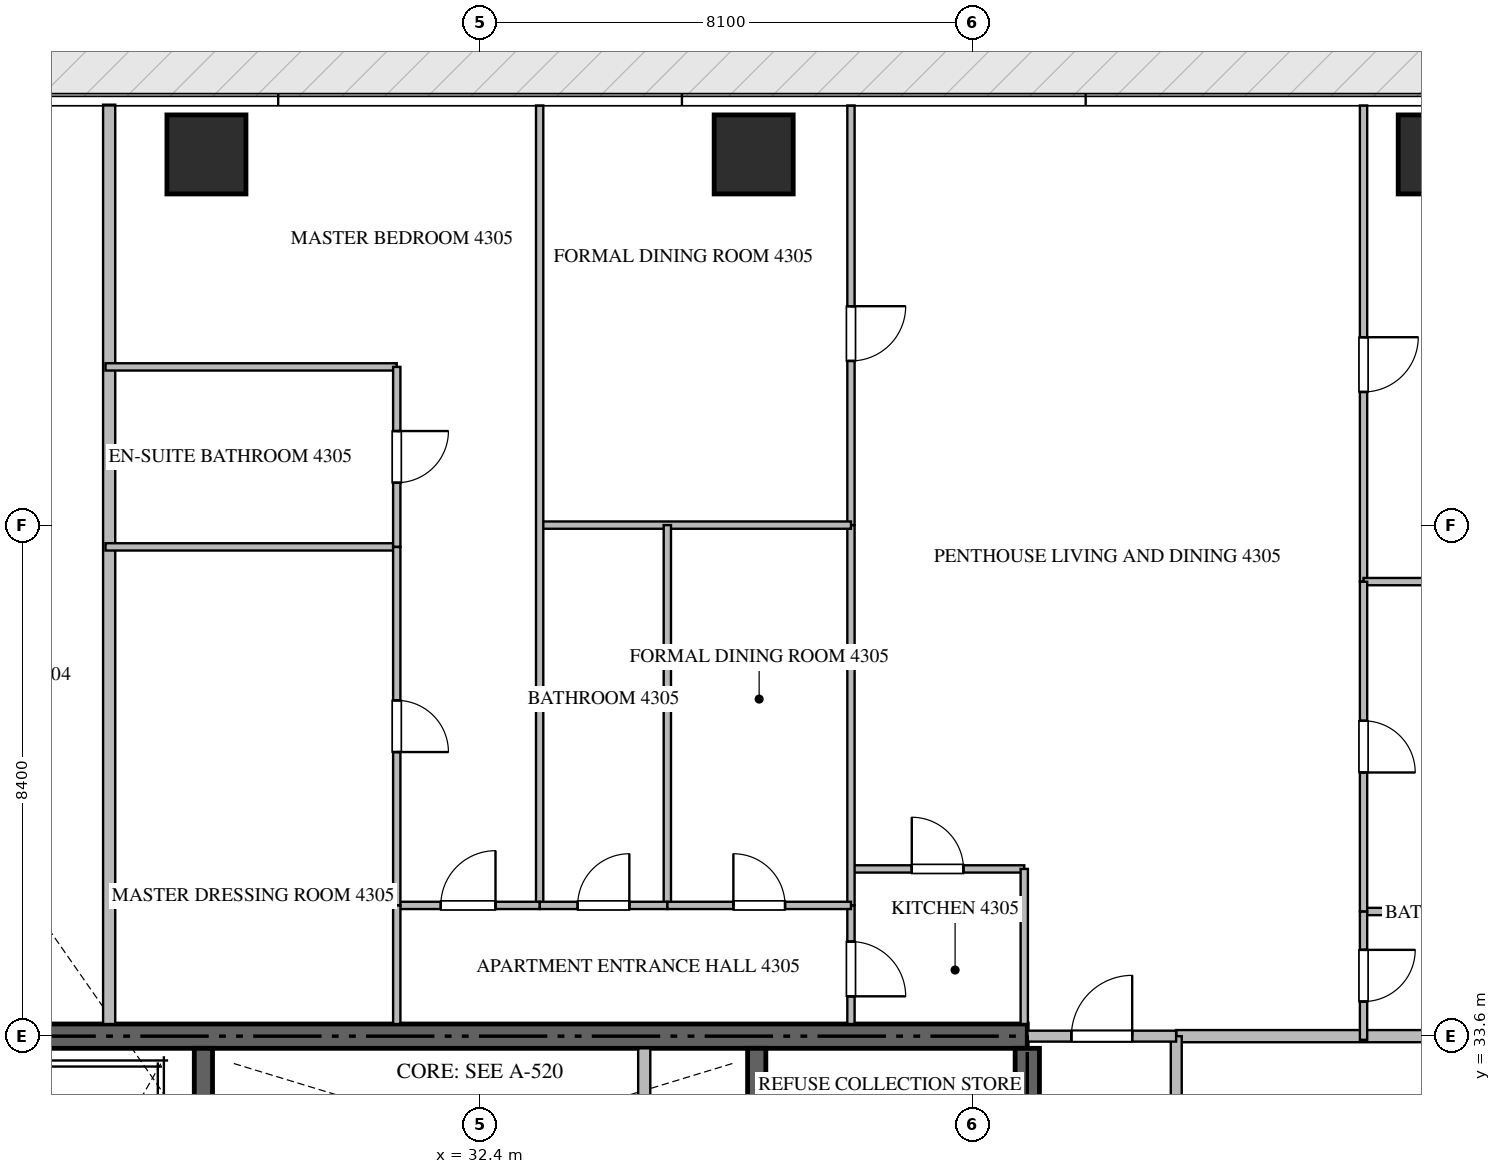
"""IFC4 building model, lengths in metres.
Left out: names, types, materials, properties, quantities, classifications, styles, units other than length and angle.
Written with IfcOpenShell. Run it as: python <this file> out.ifc"""

import sys

from ifc_helpers import new_model, si_unit, direction, frame, frame_2d, origin, origin_2d, place, context, subcontext, project, spatial, rectangle, extrude, source, transform, mapped, element, fill, save


model = new_model("IFC4")
c1 = context("Model", 3, precision=1e-05, world=origin(), true_north=direction((0.0, 1.0)))
c2 = subcontext(c1, "Body", "Model", "MODEL_VIEW")
j1 = project(units=[si_unit("LENGTHUNIT", "METRE"), si_unit("PLANEANGLEUNIT", "RADIAN")], contexts=[c1])
p1 = place(None, origin())
s1 = spatial("IfcSite", under=j1, at=p1, CompositionType="ELEMENT")
p2 = place(p1, origin())
s2 = spatial("IfcBuilding", under=s1, at=p2, CompositionType="ELEMENT")
p3 = place(p2, frame((0.0, 0.0, 172.65)))
s3 = spatial("IfcBuildingStorey", under=s2, at=p3, CompositionType="ELEMENT", Elevation=172.65)
p4 = place(p3, frame((41.4, 33.6, -0.26), z_axis=(0.0, 0.0, 1.0), x_axis=(-1.0, 0.0, 0.0)))
e1 = element("IfcWall", 1, at=p4, inside=s3, PredefinedType="SHEAR", context=c2, shape_type="SweptSolid", body=[
    extrude(rectangle(XDim=18.0, YDim=0.4, at=frame_2d((9.0, 0.0))), origin(), (0.0, 0.0, 1.0), 3.748),
])
p5 = place(p3, frame((41.4, 27.75, -0.26), z_axis=(0.0, 0.0, 1.0), x_axis=(0.0, 1.0, 0.0)))
e2 = element("IfcWall", 2, at=p5, inside=s3, PredefinedType="SHEAR", context=c2, shape_type="SweptSolid", body=[
    extrude(rectangle(XDim=5.65, YDim=0.4, at=frame_2d((2.825, 0.0))), origin(), (0.0, 0.0, 1.0), 3.748),
])
p6 = place(p3, frame((27.85, 23.55, -0.26), z_axis=(0.0, 0.0, 1.0), x_axis=(0.0, 1.0, 0.0)))
e3 = element("IfcWall", 3, at=p6, inside=s3, PredefinedType="SHEAR", context=c2, shape_type="SweptSolid", body=[
    extrude(rectangle(XDim=9.85, YDim=0.3, at=frame_2d((4.925, 0.0))), origin(), (0.0, 0.0, 1.0), 3.748),
])
p7 = place(p3, frame((36.95, 27.05, -0.26), z_axis=(0.0, 0.0, 1.0), x_axis=(0.0, 1.0, 0.0)))
e4 = element("IfcWall", 4, at=p7, inside=s3, PredefinedType="SHEAR", context=c2, shape_type="SweptSolid", body=[
    extrude(rectangle(XDim=6.35, YDim=0.3, at=frame_2d((3.175, 0.0))), origin(), (0.0, 0.0, 1.0), 3.748),
])
m1 = source(origin(), c2, "Body", "SweptSolid", [
    extrude(rectangle(XDim=1.3, YDim=1.3, at=origin_2d()), origin(), (0.0, 0.0, 1.0), 3.75),
])
for number, where, z_axis, x_axis in (
    (5, (27.9, 48.1, -0.26), (0.0, 0.0, 1.0), (1.0, 0.0, 0.0)),
    (6, (36.9, 48.1, -0.26), (0.0, 0.0, 1.0), (1.0, 0.0, 0.0)),
    (7, (48.15, 48.1, -0.26), (0.0, 0.0, 1.0), (1.0, 0.0, 0.0)),
):
    element("IfcColumn", number, at=place(p3, frame(where, z_axis=z_axis, x_axis=x_axis)), inside=s3, PredefinedType="COLUMN", context=c2, shape_type="MappedRepresentation", body=[
        mapped(m1, transform((0.0, 0.0, 0.0), scale=1.0)),
    ])
p8 = place(p3, frame((35.1, 30.75, 0.0), z_axis=(0.0, 0.0, 1.0), x_axis=(0.0, 1.0, 0.0)))
e8 = element("IfcWall", 8, at=p8, inside=s3, PredefinedType="STANDARD", context=c2, shape_type="SweptSolid", body=[
    extrude(rectangle(XDim=2.65, YDim=0.2, at=frame_2d((1.325, 0.0))), origin(), (0.0, 0.0, 1.0), 3.49),
])
p9 = place(p3, frame((26.3, 33.8, 0.0), z_axis=(0.0, 0.0, 1.0), x_axis=(0.0, 1.0, 0.0)))
e9 = element("IfcWall", 9, at=p9, inside=s3, PredefinedType="PARTITIONING", context=c2, shape_type="SweptSolid", body=[
    extrude(rectangle(XDim=15.118, YDim=0.2, at=frame_2d((7.559, 0.0))), origin(), (0.0, 0.0, 1.0), 3.49),
])
p10 = place(p3, frame((43.85, 33.6, 0.0), z_axis=(0.0, 0.0, 1.0), x_axis=(1.0, 0.0, 0.0)))
e10 = element("IfcWall", 10, at=p10, inside=s3, PredefinedType="PARTITIONING", context=c2, shape_type="SweptSolid", body=[
    extrude(rectangle(XDim=13.068, YDim=0.2, at=frame_2d((6.534, 0.0))), origin(), (0.0, 0.0, 1.0), 3.49),
])
p11 = place(p3, frame((43.85, 14.9, 0.0), z_axis=(0.0, 0.0, 1.0), x_axis=(0.0, 1.0, 0.0)))
e11 = element("IfcWall", 11, at=p11, inside=s3, PredefinedType="PARTITIONING", context=c2, shape_type="SweptSolid", body=[
    extrude(rectangle(XDim=18.7, YDim=0.18, at=frame_2d((9.35, 0.0))), origin(), (0.0, 0.0, 1.0), 3.49),
])
p12 = place(p11, frame((1.805, 0.0, 0.0)))
e12 = element("IfcOpeningElement", 12, at=p12, cuts=e11, PredefinedType="OPENING", context=c2, shape_type="SweptSolid", body=[
    extrude(rectangle(XDim=1.0, YDim=2.15, at=frame_2d((0.5, 1.075))), frame((0.0, 0.1, 0.0), z_axis=(0.0, -1.0, 0.0), x_axis=(1.0, 0.0, 0.0)), (0.0, 0.0, 1.0), 0.2),
])
p13 = place(p3, frame((41.402, 33.6, 0.0), z_axis=(0.0, 0.0, 1.0), x_axis=(1.0, 0.0, 0.0)))
e13 = element("IfcWall", 13, at=p13, inside=s3, PredefinedType="PARTITIONING", context=c2, shape_type="SweptSolid", body=[
    extrude(rectangle(XDim=2.446, YDim=0.18, at=frame_2d((1.223, 0.0))), origin(), (0.0, 0.0, 1.0), 3.49),
])
p14 = place(p13, frame((0.723, 0.0, 0.0)))
e14 = element("IfcOpeningElement", 14, at=p14, cuts=e13, PredefinedType="OPENING", context=c2, shape_type="SweptSolid", body=[
    extrude(rectangle(XDim=1.0, YDim=2.15, at=frame_2d((0.5, 1.075))), frame((0.0, 0.1, 0.0), z_axis=(0.0, -1.0, 0.0), x_axis=(1.0, 0.0, 0.0)), (0.0, 0.0, 1.0), 0.2),
])
p15 = place(p3, frame((38.5, 36.35, 0.0), z_axis=(0.0, 0.0, 1.0), x_axis=(1.0, 0.0, 0.0)))
e15 = element("IfcWall", 15, at=p15, inside=s3, PredefinedType="PARTITIONING", context=c2, shape_type="SweptSolid", body=[
    extrude(rectangle(XDim=2.85, YDim=0.12, at=frame_2d((1.425, 0.0))), origin(), (0.0, 0.0, 1.0), 3.49),
])
p16 = place(p15, frame((1.0, 0.0, 0.0)))
e16 = element("IfcOpeningElement", 16, at=p16, cuts=e15, PredefinedType="OPENING", context=c2, shape_type="SweptSolid", body=[
    extrude(rectangle(XDim=0.85, YDim=2.1, at=frame_2d((0.425, 1.05))), frame((0.0, 0.07, 0.0), z_axis=(0.0, -1.0, 0.0), x_axis=(1.0, 0.0, 0.0)), (0.0, 0.0, 1.0), 0.14),
])
p17 = place(p3, frame((41.35, 36.35, 0.0), z_axis=(0.0, 0.0, 1.0), x_axis=(0.0, -1.0, 0.0)))
e17 = element("IfcWall", 17, at=p17, inside=s3, PredefinedType="PARTITIONING", context=c2, shape_type="SweptSolid", body=[
    extrude(rectangle(XDim=2.55, YDim=0.12, at=frame_2d((1.275, 0.0))), origin(), (0.0, 0.0, 1.0), 3.49),
])
p18 = place(p3, frame((38.5, 35.75, 0.0), z_axis=(0.0, 0.0, 1.0), x_axis=(0.0, -1.0, 0.0)))
e18 = element("IfcWall", 18, at=p18, inside=s3, PredefinedType="PARTITIONING", context=c2, shape_type="SweptSolid", body=[
    extrude(rectangle(XDim=1.95, YDim=0.12, at=frame_2d((0.975, 0.0))), origin(), (0.0, 0.0, 1.0), 3.49),
])
p19 = place(p18, frame((0.595, 0.0, 0.0)))
e19 = element("IfcOpeningElement", 19, at=p19, cuts=e18, PredefinedType="OPENING", context=c2, shape_type="SweptSolid", body=[
    extrude(rectangle(XDim=0.9, YDim=2.1, at=frame_2d((0.45, 1.05))), frame((0.0, 0.07, 0.0), z_axis=(0.0, -1.0, 0.0), x_axis=(1.0, 0.0, 0.0)), (0.0, 0.0, 1.0), 0.14),
])
p20 = place(p3, frame((38.5, 48.905, 0.0), z_axis=(0.0, 0.0, 1.0), x_axis=(0.0, -1.0, 0.0)))
e20 = element("IfcWall", 20, at=p20, inside=s3, PredefinedType="PARTITIONING", context=c2, shape_type="SweptSolid", body=[
    extrude(rectangle(XDim=6.901, YDim=0.12, at=frame_2d((3.451, 0.0))), origin(), (0.0, 0.0, 1.0), 3.49),
])
p21 = place(p20, frame((3.301, 0.0, 0.0)))
e21 = element("IfcOpeningElement", 21, at=p21, cuts=e20, PredefinedType="OPENING", context=c2, shape_type="SweptSolid", body=[
    extrude(rectangle(XDim=0.9, YDim=2.1, at=frame_2d((0.45, 1.05))), frame((0.0, 0.07, 0.0), z_axis=(0.0, -1.0, 0.0), x_axis=(1.0, 0.0, 0.0)), (0.0, 0.0, 1.0), 0.14),
])
p22 = place(p3, frame((38.5, 42.002, 0.0), z_axis=(0.0, 0.0, 1.0), x_axis=(0.0, -1.0, 0.0)))
e22 = element("IfcWall", 22, at=p22, inside=s3, PredefinedType="PARTITIONING", context=c2, shape_type="SweptSolid", body=[
    extrude(rectangle(XDim=6.25, YDim=0.12, at=frame_2d((3.125, 0.0))), origin(), (0.0, 0.0, 1.0), 3.49),
])
p23 = place(p3, frame((33.38, 42.004, 0.0), z_axis=(0.0, 0.0, 1.0), x_axis=(1.0, 0.0, 0.0)))
e23 = element("IfcWall", 23, at=p23, inside=s3, PredefinedType="PARTITIONING", context=c2, shape_type="SweptSolid", body=[
    extrude(rectangle(XDim=5.12, YDim=0.12, at=frame_2d((2.56, 0.0))), origin(), (0.0, 0.0, 1.0), 3.49),
])
p24 = place(p3, frame((33.38, 48.905, 0.0), z_axis=(0.0, 0.0, 1.0), x_axis=(0.0, -1.0, 0.0)))
e24 = element("IfcWall", 24, at=p24, inside=s3, PredefinedType="PARTITIONING", context=c2, shape_type="SweptSolid", body=[
    extrude(rectangle(XDim=13.155, YDim=0.12, at=frame_2d((6.578, 0.0))), origin(), (0.0, 0.0, 1.0), 3.49),
])
p25 = place(p3, frame((35.48, 42.004, 0.0), z_axis=(0.0, 0.0, 1.0), x_axis=(0.0, -1.0, 0.0)))
e25 = element("IfcWall", 25, at=p25, inside=s3, PredefinedType="PARTITIONING", context=c2, shape_type="SweptSolid", body=[
    extrude(rectangle(XDim=6.254, YDim=0.12, at=frame_2d((3.127, 0.0))), origin(), (0.0, 0.0, 1.0), 3.49),
])
p26 = place(p3, frame((33.38, 35.75, 0.0), z_axis=(0.0, 0.0, 1.0), x_axis=(1.0, 0.0, 0.0)))
e26 = element("IfcWall", 26, at=p26, inside=s3, PredefinedType="PARTITIONING", context=c2, shape_type="SweptSolid", body=[
    extrude(rectangle(XDim=2.1, YDim=0.12, at=frame_2d((1.05, 0.0))), origin(), (0.0, 0.0, 1.0), 3.49),
])
p27 = place(p26, frame((0.625, 0.0, 0.0)))
e27 = element("IfcOpeningElement", 27, at=p27, cuts=e26, PredefinedType="OPENING", context=c2, shape_type="SweptSolid", body=[
    extrude(rectangle(XDim=0.85, YDim=2.1, at=frame_2d((0.425, 1.05))), frame((0.0, 0.07, 0.0), z_axis=(0.0, -1.0, 0.0), x_axis=(1.0, 0.0, 0.0)), (0.0, 0.0, 1.0), 0.14),
])
p28 = place(p3, frame((35.482, 35.75, 0.0), z_axis=(0.0, 0.0, 1.0), x_axis=(1.0, 0.0, 0.0)))
e28 = element("IfcWall", 28, at=p28, inside=s3, PredefinedType="PARTITIONING", context=c2, shape_type="SweptSolid", body=[
    extrude(rectangle(XDim=3.018, YDim=0.12, at=frame_2d((1.509, 0.0))), origin(), (0.0, 0.0, 1.0), 3.49),
])
p29 = place(p28, frame((1.084, 0.0, 0.0)))
e29 = element("IfcOpeningElement", 29, at=p29, cuts=e28, PredefinedType="OPENING", context=c2, shape_type="SweptSolid", body=[
    extrude(rectangle(XDim=0.85, YDim=2.1, at=frame_2d((0.425, 1.05))), frame((0.0, 0.07, 0.0), z_axis=(0.0, -1.0, 0.0), x_axis=(1.0, 0.0, 0.0)), (0.0, 0.0, 1.0), 0.14),
])
p30 = place(p3, frame((31.03, 35.75, 0.0), z_axis=(0.0, 0.0, 1.0), x_axis=(1.0, 0.0, 0.0)))
e30 = element("IfcWall", 30, at=p30, inside=s3, PredefinedType="PARTITIONING", context=c2, shape_type="SweptSolid", body=[
    extrude(rectangle(XDim=2.348, YDim=0.12, at=frame_2d((1.174, 0.0))), origin(), (0.0, 0.0, 1.0), 3.49),
])
p31 = place(p30, frame((0.724, 0.0, 0.0)))
e31 = element("IfcOpeningElement", 31, at=p31, cuts=e30, PredefinedType="OPENING", context=c2, shape_type="SweptSolid", body=[
    extrude(rectangle(XDim=0.9, YDim=2.1, at=frame_2d((0.45, 1.05))), frame((0.0, 0.07, 0.0), z_axis=(0.0, -1.0, 0.0), x_axis=(1.0, 0.0, 0.0)), (0.0, 0.0, 1.0), 0.14),
])
for number, where, z_axis, x_axis in (
    (32, (26.24, 44.606, 0.0), (0.0, 0.0, 1.0), (1.0, 0.0, 0.0)),
    (33, (26.24, 41.646, 0.0), (0.0, 0.0, 1.0), (1.0, 0.0, 0.0)),
):
    element("IfcWall", number, at=place(p3, frame(where, z_axis=z_axis, x_axis=x_axis)), inside=s3, PredefinedType="PARTITIONING", context=c2, shape_type="SweptSolid", body=[
        extrude(rectangle(XDim=4.79, YDim=0.12, at=frame_2d((2.395, 0.0))), origin(), (0.0, 0.0, 1.0), 3.49),
    ])
p32 = place(p3, frame((31.03, 44.606, 0.0), z_axis=(0.0, 0.0, 1.0), x_axis=(0.0, -1.0, 0.0)))
e34 = element("IfcWall", 34, at=p32, inside=s3, PredefinedType="PARTITIONING", context=c2, shape_type="SweptSolid", body=[
    extrude(rectangle(XDim=2.96, YDim=0.12, at=frame_2d((1.48, 0.0))), origin(), (0.0, 0.0, 1.0), 3.49),
])
p33 = place(p32, frame((1.055, 0.0, 0.0)))
e35 = element("IfcOpeningElement", 35, at=p33, cuts=e34, PredefinedType="OPENING", context=c2, shape_type="SweptSolid", body=[
    extrude(rectangle(XDim=0.85, YDim=2.1, at=frame_2d((0.425, 1.05))), frame((0.0, 0.07, 0.0), z_axis=(0.0, -1.0, 0.0), x_axis=(1.0, 0.0, 0.0)), (0.0, 0.0, 1.0), 0.14),
])
p34 = place(p3, frame((31.03, 41.644, 0.0), z_axis=(0.0, 0.0, 1.0), x_axis=(0.0, -1.0, 0.0)))
e36 = element("IfcWall", 36, at=p34, inside=s3, PredefinedType="PARTITIONING", context=c2, shape_type="SweptSolid", body=[
    extrude(rectangle(XDim=5.894, YDim=0.12, at=frame_2d((2.947, 0.0))), origin(), (0.0, 0.0, 1.0), 3.49),
])
p35 = place(p34, frame((2.522, 0.0, 0.0)))
e37 = element("IfcOpeningElement", 37, at=p35, cuts=e36, PredefinedType="OPENING", context=c2, shape_type="SweptSolid", body=[
    extrude(rectangle(XDim=0.85, YDim=2.1, at=frame_2d((0.425, 1.05))), frame((0.0, 0.07, 0.0), z_axis=(0.0, -1.0, 0.0), x_axis=(1.0, 0.0, 0.0)), (0.0, 0.0, 1.0), 0.14),
])
p36 = place(p3, frame((31.03, 35.748, 0.0), z_axis=(0.0, 0.0, 1.0), x_axis=(0.0, -1.0, 0.0)))
e38 = element("IfcWall", 38, at=p36, inside=s3, PredefinedType="PARTITIONING", context=c2, shape_type="SweptSolid", body=[
    extrude(rectangle(XDim=1.948, YDim=0.12, at=frame_2d((0.974, 0.0))), origin(), (0.0, 0.0, 1.0), 3.49),
])
p37 = place(p3, frame((46.93, 48.905, 0.0), z_axis=(0.0, 0.0, 1.0), x_axis=(0.0, -1.0, 0.0)))
e39 = element("IfcWall", 39, at=p37, inside=s3, PredefinedType="PARTITIONING", context=c2, shape_type="SweptSolid", body=[
    extrude(rectangle(XDim=7.83, YDim=0.12, at=frame_2d((3.915, 0.0))), origin(), (0.0, 0.0, 1.0), 3.49),
])
p38 = place(p37, frame((3.811, 0.0, 0.0)))
e40 = element("IfcOpeningElement", 40, at=p38, cuts=e39, PredefinedType="OPENING", context=c2, shape_type="SweptSolid", body=[
    extrude(rectangle(XDim=0.9, YDim=2.1, at=frame_2d((0.45, 1.05))), frame((0.0, 0.07, 0.0), z_axis=(0.0, -1.0, 0.0), x_axis=(1.0, 0.0, 0.0)), (0.0, 0.0, 1.0), 0.14),
])
p39 = place(p3, frame((46.93, 41.075, 0.0), z_axis=(0.0, 0.0, 1.0), x_axis=(1.0, 0.0, 0.0)))
e41 = element("IfcWall", 41, at=p39, inside=s3, PredefinedType="PARTITIONING", context=c2, shape_type="SweptSolid", body=[
    extrude(rectangle(XDim=5.975, YDim=0.12, at=frame_2d((2.988, 0.0))), origin(), (0.0, 0.0, 1.0), 3.49),
])
p40 = place(p3, frame((46.93, 35.65, 0.0), z_axis=(0.0, 0.0, 1.0), x_axis=(1.0, 0.0, 0.0)))
e42 = element("IfcWall", 42, at=p40, inside=s3, PredefinedType="PARTITIONING", context=c2, shape_type="SweptSolid", body=[
    extrude(rectangle(XDim=3.2, YDim=0.12, at=frame_2d((1.6, 0.0))), origin(), (0.0, 0.0, 1.0), 3.49),
])
p41 = place(p3, frame((46.93, 41.073, 0.0), z_axis=(0.0, 0.0, 1.0), x_axis=(0.0, -1.0, 0.0)))
e43 = element("IfcWall", 43, at=p41, inside=s3, PredefinedType="PARTITIONING", context=c2, shape_type="SweptSolid", body=[
    extrude(rectangle(XDim=5.423, YDim=0.12, at=frame_2d((2.711, 0.0))), origin(), (0.0, 0.0, 1.0), 3.49),
])
p42 = place(p41, frame((2.287, 0.0, 0.0)))
e44 = element("IfcOpeningElement", 44, at=p42, cuts=e43, PredefinedType="OPENING", context=c2, shape_type="SweptSolid", body=[
    extrude(rectangle(XDim=0.85, YDim=2.1, at=frame_2d((0.425, 1.05))), frame((0.0, 0.07, 0.0), z_axis=(0.0, -1.0, 0.0), x_axis=(1.0, 0.0, 0.0)), (0.0, 0.0, 1.0), 0.14),
])
p43 = place(p3, frame((46.93, 35.648, 0.0), z_axis=(0.0, 0.0, 1.0), x_axis=(0.0, -1.0, 0.0)))
e45 = element("IfcWall", 45, at=p43, inside=s3, PredefinedType="PARTITIONING", context=c2, shape_type="SweptSolid", body=[
    extrude(rectangle(XDim=2.108, YDim=0.12, at=frame_2d((1.054, 0.0))), origin(), (0.0, 0.0, 1.0), 3.49),
])
p44 = place(p43, frame((0.629, 0.0, 0.0)))
e46 = element("IfcOpeningElement", 46, at=p44, cuts=e45, PredefinedType="OPENING", context=c2, shape_type="SweptSolid", body=[
    extrude(rectangle(XDim=0.85, YDim=2.1, at=frame_2d((0.425, 1.05))), frame((0.0, 0.07, 0.0), z_axis=(0.0, -1.0, 0.0), x_axis=(1.0, 0.0, 0.0)), (0.0, 0.0, 1.0), 0.14),
])
m2 = source(origin(), c2, "Body", "SweptSolid", [
    extrude(rectangle(XDim=1.0, YDim=2.15, at=frame_2d((0.5, 1.075))), frame((0.0, 0.025, 0.0), z_axis=(0.0, -1.0, 0.0), x_axis=(1.0, 0.0, 0.0)), (0.0, 0.0, 1.0), 0.05),
])
p45 = place(p14, origin())
e47 = element("IfcDoor", 47, at=p45, inside=s3, OperationType="SINGLE_SWING_RIGHT", PredefinedType="DOOR", context=c2, shape_type="MappedRepresentation", body=[
    mapped(m2, transform((0.0, 0.0, 0.0), scale=1.0)),
])
fill(e14, e47)
m3 = source(origin(), c2, "Body", "SweptSolid", [
    extrude(rectangle(XDim=0.85, YDim=2.1, at=frame_2d((0.425, 1.05))), frame((0.0, 0.025, 0.0), z_axis=(0.0, -1.0, 0.0), x_axis=(1.0, 0.0, 0.0)), (0.0, 0.0, 1.0), 0.05),
])
p46 = place(p16, origin())
e48 = element("IfcDoor", 48, at=p46, inside=s3, OperationType="SINGLE_SWING_LEFT", PredefinedType="DOOR", context=c2, shape_type="MappedRepresentation", body=[
    mapped(m3, transform((0.0, 0.0, 0.0), scale=1.0)),
])
fill(e16, e48)
m4 = source(origin(), c2, "Body", "SweptSolid", [
    extrude(rectangle(XDim=0.9, YDim=2.1, at=frame_2d((0.45, 1.05))), frame((0.0, 0.025, 0.0), z_axis=(0.0, -1.0, 0.0), x_axis=(1.0, 0.0, 0.0)), (0.0, 0.0, 1.0), 0.05),
])
p47 = place(p19, origin())
e49 = element("IfcDoor", 49, at=p47, inside=s3, OperationType="SINGLE_SWING_RIGHT", PredefinedType="DOOR", context=c2, shape_type="MappedRepresentation", body=[
    mapped(m4, transform((0.0, 0.0, 0.0), scale=1.0)),
])
fill(e19, e49)
p48 = place(p21, origin())
e50 = element("IfcDoor", 50, at=p48, inside=s3, OperationType="SINGLE_SWING_LEFT", PredefinedType="DOOR", context=c2, shape_type="MappedRepresentation", body=[
    mapped(m4, transform((0.0, 0.0, 0.0), scale=1.0)),
])
fill(e21, e50)
p49 = place(p27, origin())
e51 = element("IfcDoor", 51, at=p49, inside=s3, OperationType="SINGLE_SWING_RIGHT", PredefinedType="DOOR", context=c2, shape_type="MappedRepresentation", body=[
    mapped(m3, transform((0.0, 0.0, 0.0), scale=1.0)),
])
fill(e27, e51)
p50 = place(p29, origin())
e52 = element("IfcDoor", 52, at=p50, inside=s3, OperationType="SINGLE_SWING_LEFT", PredefinedType="DOOR", context=c2, shape_type="MappedRepresentation", body=[
    mapped(m3, transform((0.0, 0.0, 0.0), scale=1.0)),
])
fill(e29, e52)
p51 = place(p31, origin())
e53 = element("IfcDoor", 53, at=p51, inside=s3, OperationType="SINGLE_SWING_RIGHT", PredefinedType="DOOR", context=c2, shape_type="MappedRepresentation", body=[
    mapped(m4, transform((0.0, 0.0, 0.0), scale=1.0)),
])
fill(e31, e53)
p52 = place(p33, origin())
e54 = element("IfcDoor", 54, at=p52, inside=s3, OperationType="SINGLE_SWING_LEFT", PredefinedType="DOOR", context=c2, shape_type="MappedRepresentation", body=[
    mapped(m3, transform((0.0, 0.0, 0.0), scale=1.0)),
])
fill(e35, e54)
p53 = place(p35, origin())
e55 = element("IfcDoor", 55, at=p53, inside=s3, OperationType="SINGLE_SWING_RIGHT", PredefinedType="DOOR", context=c2, shape_type="MappedRepresentation", body=[
    mapped(m3, transform((0.0, 0.0, 0.0), scale=1.0)),
])
fill(e37, e55)
p54 = place(p38, origin())
e56 = element("IfcDoor", 56, at=p54, inside=s3, OperationType="SINGLE_SWING_LEFT", PredefinedType="DOOR", context=c2, shape_type="MappedRepresentation", body=[
    mapped(m4, transform((0.0, 0.0, 0.0), scale=1.0)),
])
fill(e40, e56)
p55 = place(p42, origin())
e57 = element("IfcDoor", 57, at=p55, inside=s3, OperationType="SINGLE_SWING_RIGHT", PredefinedType="DOOR", context=c2, shape_type="MappedRepresentation", body=[
    mapped(m3, transform((0.0, 0.0, 0.0), scale=1.0)),
])
fill(e44, e57)
p56 = place(p44, origin())
e58 = element("IfcDoor", 58, at=p56, inside=s3, OperationType="SINGLE_SWING_LEFT", PredefinedType="DOOR", context=c2, shape_type="MappedRepresentation", body=[
    mapped(m3, transform((0.0, 0.0, 0.0), scale=1.0)),
])
fill(e46, e58)
save(model, sys.argv[1])
